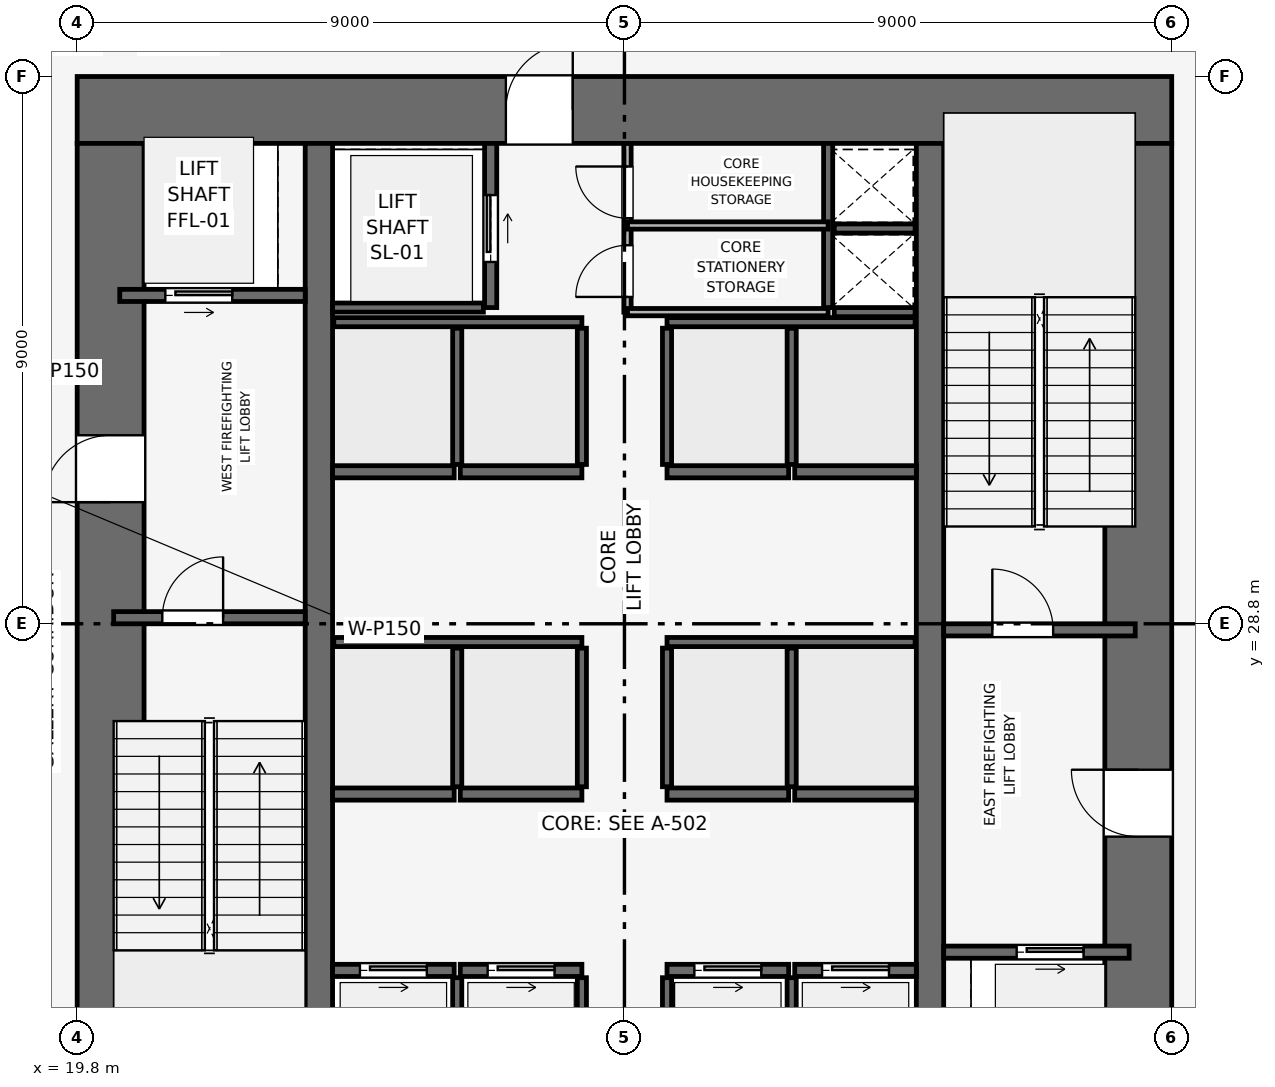
"""IFC4 building model, lengths in metres.
Left out: names, types, materials, properties, quantities, classifications, styles, units other than length and angle.
Written with IfcOpenShell. Run it as: python <this file> out.ifc"""

import sys

from ifc_helpers import new_model, si_unit, direction, frame, frame_2d, origin, place, context, subcontext, project, spatial, rectangle, extrude, element, fill, save


model = new_model("IFC4")
c1 = context("Model", 3, precision=1e-05, world=origin(), true_north=direction((0.0, 1.0)))
c2 = subcontext(c1, "Body", "Model", "MODEL_VIEW")
j1 = project(units=[si_unit("LENGTHUNIT", "METRE"), si_unit("PLANEANGLEUNIT", "RADIAN")], contexts=[c1])
p1 = place(None, origin())
s1 = spatial("IfcSite", under=j1, at=p1, CompositionType="ELEMENT")
p2 = place(p1, origin())
s2 = spatial("IfcBuilding", under=s1, at=p2, CompositionType="ELEMENT")
p3 = place(p2, frame((0.0, 0.0, 19.2)))
s3 = spatial("IfcBuildingStorey", under=s2, at=p3, CompositionType="ELEMENT", Elevation=19.2)
p4 = place(p3, frame((19.8, 37.25, 0.0), z_axis=(0.0, 0.0, 1.0), x_axis=(1.0, 0.0, 0.0)))
e1 = element("IfcWall", 1, at=p4, inside=s3, PredefinedType="SHEAR", context=c2, shape_type="SweptSolid", body=[
    extrude(rectangle(XDim=18.0, YDim=1.1, at=frame_2d((9.0, 0.0))), origin(), (0.0, 0.0, 1.0), 4.8),
])
p5 = place(p4, frame((7.05, 0.0, 0.0)))
e2 = element("IfcOpeningElement", 2, at=p5, cuts=e1, PredefinedType="OPENING", context=c2, shape_type="SweptSolid", body=[
    extrude(rectangle(XDim=1.1, YDim=2.15, at=frame_2d((0.55, 1.075))), frame((0.0, 0.56, 0.0), z_axis=(0.0, -1.0, 0.0), x_axis=(1.0, 0.0, 0.0)), (0.0, 0.0, 1.0), 1.12),
])
p6 = place(p3, frame((20.35, 20.9, 0.0), z_axis=(0.0, 0.0, 1.0), x_axis=(0.0, 1.0, 0.0)))
e3 = element("IfcWall", 3, at=p6, inside=s3, PredefinedType="SHEAR", context=c2, shape_type="SweptSolid", body=[
    extrude(rectangle(XDim=15.8, YDim=1.1, at=frame_2d((7.9, 0.0))), origin(), (0.0, 0.0, 1.0), 4.8),
])
p7 = place(p6, frame((9.9, 0.0, 0.0)))
e4 = element("IfcOpeningElement", 4, at=p7, cuts=e3, PredefinedType="OPENING", context=c2, shape_type="SweptSolid", body=[
    extrude(rectangle(XDim=1.1, YDim=2.15, at=frame_2d((0.55, 1.075))), frame((0.0, 0.56, 0.0), z_axis=(0.0, -1.0, 0.0), x_axis=(1.0, 0.0, 0.0)), (0.0, 0.0, 1.0), 1.12),
])
p8 = place(p3, frame((37.25, 20.9, 0.0), z_axis=(0.0, 0.0, 1.0), x_axis=(0.0, 1.0, 0.0)))
e5 = element("IfcWall", 5, at=p8, inside=s3, PredefinedType="SHEAR", context=c2, shape_type="SweptSolid", body=[
    extrude(rectangle(XDim=15.8, YDim=1.1, at=frame_2d((7.9, 0.0))), origin(), (0.0, 0.0, 1.0), 4.8),
])
p9 = place(p8, frame((4.4, 0.0, 0.0)))
e6 = element("IfcOpeningElement", 6, at=p9, cuts=e5, PredefinedType="OPENING", context=c2, shape_type="SweptSolid", body=[
    extrude(rectangle(XDim=1.1, YDim=2.15, at=frame_2d((0.55, 1.075))), frame((0.0, 0.56, 0.0), z_axis=(0.0, -1.0, 0.0), x_axis=(1.0, 0.0, 0.0)), (0.0, 0.0, 1.0), 1.12),
])
for number, where, z_axis, x_axis in (
    (7, (23.775, 20.9, 0.0), (0.0, 0.0, 1.0), (0.0, 1.0, 0.0)),
    (8, (33.825, 20.9, 0.0), (0.0, 0.0, 1.0), (0.0, 1.0, 0.0)),
):
    element("IfcWall", number, at=place(p3, frame(where, z_axis=z_axis, x_axis=x_axis)), inside=s3, PredefinedType="SHEAR", context=c2, shape_type="SweptSolid", body=[
        extrude(rectangle(XDim=15.8, YDim=0.45, at=frame_2d((7.9, 0.0))), origin(), (0.0, 0.0, 1.0), 4.8),
    ])
p10 = place(p3, frame((20.4, 28.9, 0.0), z_axis=(0.0, 0.0, 1.0), x_axis=(1.0, 0.0, 0.0)))
e9 = element("IfcWall", 9, at=p10, inside=s3, PredefinedType="SHEAR", context=c2, shape_type="SweptSolid", body=[
    extrude(rectangle(XDim=3.15, YDim=0.2, at=frame_2d((1.575, 0.0))), origin(), (0.0, 0.0, 1.0), 4.35),
])
p11 = place(p10, frame((0.8, 0.0, 0.0)))
e10 = element("IfcOpeningElement", 10, at=p11, cuts=e9, PredefinedType="OPENING", context=c2, shape_type="SweptSolid", body=[
    extrude(rectangle(XDim=1.0, YDim=2.1, at=frame_2d((0.5, 1.05))), frame((0.0, 0.11, 0.0), z_axis=(0.0, -1.0, 0.0), x_axis=(1.0, 0.0, 0.0)), (0.0, 0.0, 1.0), 0.22),
])
p12 = place(p3, frame((34.05, 28.7, 0.0), z_axis=(0.0, 0.0, 1.0), x_axis=(1.0, 0.0, 0.0)))
e11 = element("IfcWall", 11, at=p12, inside=s3, PredefinedType="SHEAR", context=c2, shape_type="SweptSolid", body=[
    extrude(rectangle(XDim=3.15, YDim=0.2, at=frame_2d((1.575, 0.0))), origin(), (0.0, 0.0, 1.0), 4.35),
])
p13 = place(p12, frame((0.8, 0.0, 0.0)))
e12 = element("IfcOpeningElement", 12, at=p13, cuts=e11, PredefinedType="OPENING", context=c2, shape_type="SweptSolid", body=[
    extrude(rectangle(XDim=1.0, YDim=2.1, at=frame_2d((0.5, 1.05))), frame((0.0, 0.11, 0.0), z_axis=(0.0, -1.0, 0.0), x_axis=(1.0, 0.0, 0.0)), (0.0, 0.0, 1.0), 0.22),
])
p14 = place(p3, frame((32.15, 34.0, 0.0), z_axis=(0.0, 0.0, 1.0), x_axis=(0.0, 1.0, 0.0)))
e13 = element("IfcWall", 13, at=p14, inside=s3, PredefinedType="SHEAR", context=c2, shape_type="SweptSolid", body=[
    extrude(rectangle(XDim=2.7, YDim=0.15, at=frame_2d((1.35, 0.0))), origin(), (0.0, 0.0, 1.0), 4.35),
])
for number, where, z_axis, x_axis in (
    (14, (32.25, 33.925, 0.0), (0.0, 0.0, 1.0), (1.0, 0.0, 0.0)),
    (15, (32.25, 35.3, 0.0), (0.0, 0.0, 1.0), (1.0, 0.0, 0.0)),
):
    element("IfcWall", number, at=place(p3, frame(where, z_axis=z_axis, x_axis=x_axis)), inside=s3, PredefinedType="SHEAR", context=c2, shape_type="SweptSolid", body=[
        extrude(rectangle(XDim=1.33, YDim=0.15, at=frame_2d((0.665, 0.0))), origin(), (0.0, 0.0, 1.0), 4.35),
    ])
p15 = place(p3, frame((20.5, 34.2, 0.0), z_axis=(0.0, 0.0, 1.0), x_axis=(1.0, 0.0, 0.0)))
e16 = element("IfcWall", 16, at=p15, inside=s3, PredefinedType="SHEAR", context=c2, shape_type="SweptSolid", body=[
    extrude(rectangle(XDim=3.05, YDim=0.2, at=frame_2d((1.525, 0.0))), origin(), (0.0, 0.0, 1.0), 4.35),
])
p16 = place(p15, frame((0.75, 0.0, 0.0)))
e17 = element("IfcOpeningElement", 17, at=p16, cuts=e16, PredefinedType="OPENING", context=c2, shape_type="SweptSolid", body=[
    extrude(rectangle(XDim=1.1, YDim=2.15, at=frame_2d((0.55, 1.075))), frame((0.0, 0.11, 0.0), z_axis=(0.0, -1.0, 0.0), x_axis=(1.0, 0.0, 0.0)), (0.0, 0.0, 1.0), 0.22),
])
p17 = place(p3, frame((34.05, 23.4, 0.0), z_axis=(0.0, 0.0, 1.0), x_axis=(1.0, 0.0, 0.0)))
e18 = element("IfcWall", 18, at=p17, inside=s3, PredefinedType="SHEAR", context=c2, shape_type="SweptSolid", body=[
    extrude(rectangle(XDim=3.05, YDim=0.2, at=frame_2d((1.525, 0.0))), origin(), (0.0, 0.0, 1.0), 4.35),
])
p18 = place(p17, frame((1.2, 0.0, 0.0)))
e19 = element("IfcOpeningElement", 19, at=p18, cuts=e18, PredefinedType="OPENING", context=c2, shape_type="SweptSolid", body=[
    extrude(rectangle(XDim=1.1, YDim=2.15, at=frame_2d((0.55, 1.075))), frame((0.0, 0.11, 0.0), z_axis=(0.0, -1.0, 0.0), x_axis=(1.0, 0.0, 0.0)), (0.0, 0.0, 1.0), 0.22),
])
p19 = place(p3, frame((26.6, 34.0, 0.0), z_axis=(0.0, 0.0, 1.0), x_axis=(0.0, 1.0, 0.0)))
e20 = element("IfcWall", 20, at=p19, inside=s3, PredefinedType="SHEAR", context=c2, shape_type="SweptSolid", body=[
    extrude(rectangle(XDim=2.7, YDim=0.2, at=frame_2d((1.35, 0.0))), origin(), (0.0, 0.0, 1.0), 4.35),
])
p20 = place(p19, frame((0.75, 0.0, 0.0)))
e21 = element("IfcOpeningElement", 21, at=p20, cuts=e20, PredefinedType="OPENING", context=c2, shape_type="SweptSolid", body=[
    extrude(rectangle(XDim=1.1, YDim=2.15, at=frame_2d((0.55, 1.075))), frame((0.0, 0.11, 0.0), z_axis=(0.0, -1.0, 0.0), x_axis=(1.0, 0.0, 0.0)), (0.0, 0.0, 1.0), 0.22),
])
p21 = place(p3, frame((24.0, 34.0, 0.0), z_axis=(0.0, 0.0, 1.0), x_axis=(1.0, 0.0, 0.0)))
e22 = element("IfcWall", 22, at=p21, inside=s3, PredefinedType="SHEAR", context=c2, shape_type="SweptSolid", body=[
    extrude(rectangle(XDim=2.48, YDim=0.15, at=frame_2d((1.24, 0.0))), origin(), (0.0, 0.0, 1.0), 4.35),
])
p22 = place(p3, frame((24.0, 23.1, 0.0), z_axis=(0.0, 0.0, 1.0), x_axis=(1.0, 0.0, 0.0)))
e23 = element("IfcWall", 23, at=p22, inside=s3, PredefinedType="SHEAR", context=c2, shape_type="SweptSolid", body=[
    extrude(rectangle(XDim=2.0, YDim=0.2, at=frame_2d((1.0, 0.0))), origin(), (0.0, 0.0, 1.0), 4.35),
])
p23 = place(p22, frame((0.45, 0.0, 0.0)))
e24 = element("IfcOpeningElement", 24, at=p23, cuts=e23, PredefinedType="OPENING", context=c2, shape_type="SweptSolid", body=[
    extrude(rectangle(XDim=1.1, YDim=2.15, at=frame_2d((0.55, 1.075))), frame((0.0, 0.11, 0.0), z_axis=(0.0, -1.0, 0.0), x_axis=(1.0, 0.0, 0.0)), (0.0, 0.0, 1.0), 0.22),
])
p24 = place(p3, frame((26.1, 23.1, 0.0), z_axis=(0.0, 0.0, 1.0), x_axis=(1.0, 0.0, 0.0)))
e25 = element("IfcWall", 25, at=p24, inside=s3, PredefinedType="SHEAR", context=c2, shape_type="SweptSolid", body=[
    extrude(rectangle(XDim=2.0, YDim=0.2, at=frame_2d((1.0, 0.0))), origin(), (0.0, 0.0, 1.0), 4.35),
])
p25 = place(p24, frame((0.45, 0.0, 0.0)))
e26 = element("IfcOpeningElement", 26, at=p25, cuts=e25, PredefinedType="OPENING", context=c2, shape_type="SweptSolid", body=[
    extrude(rectangle(XDim=1.1, YDim=2.15, at=frame_2d((0.55, 1.075))), frame((0.0, 0.11, 0.0), z_axis=(0.0, -1.0, 0.0), x_axis=(1.0, 0.0, 0.0)), (0.0, 0.0, 1.0), 0.22),
])
p26 = place(p3, frame((29.5, 23.1, 0.0), z_axis=(0.0, 0.0, 1.0), x_axis=(1.0, 0.0, 0.0)))
e27 = element("IfcWall", 27, at=p26, inside=s3, PredefinedType="SHEAR", context=c2, shape_type="SweptSolid", body=[
    extrude(rectangle(XDim=2.0, YDim=0.2, at=frame_2d((1.0, 0.0))), origin(), (0.0, 0.0, 1.0), 4.35),
])
p27 = place(p26, frame((0.45, 0.0, 0.0)))
e28 = element("IfcOpeningElement", 28, at=p27, cuts=e27, PredefinedType="OPENING", context=c2, shape_type="SweptSolid", body=[
    extrude(rectangle(XDim=1.1, YDim=2.15, at=frame_2d((0.55, 1.075))), frame((0.0, 0.11, 0.0), z_axis=(0.0, -1.0, 0.0), x_axis=(1.0, 0.0, 0.0)), (0.0, 0.0, 1.0), 0.22),
])
p28 = place(p3, frame((31.6, 23.1, 0.0), z_axis=(0.0, 0.0, 1.0), x_axis=(1.0, 0.0, 0.0)))
e29 = element("IfcWall", 29, at=p28, inside=s3, PredefinedType="SHEAR", context=c2, shape_type="SweptSolid", body=[
    extrude(rectangle(XDim=2.0, YDim=0.2, at=frame_2d((1.0, 0.0))), origin(), (0.0, 0.0, 1.0), 4.35),
])
p29 = place(p28, frame((0.45, 0.0, 0.0)))
e30 = element("IfcOpeningElement", 30, at=p29, cuts=e29, PredefinedType="OPENING", context=c2, shape_type="SweptSolid", body=[
    extrude(rectangle(XDim=1.1, YDim=2.15, at=frame_2d((0.55, 1.075))), frame((0.0, 0.11, 0.0), z_axis=(0.0, -1.0, 0.0), x_axis=(1.0, 0.0, 0.0)), (0.0, 0.0, 1.0), 0.22),
])
for number, where, z_axis, x_axis in (
    (31, (24.0, 26.0, 0.0), (0.0, 0.0, 1.0), (1.0, 0.0, 0.0)),
    (32, (26.1, 26.0, 0.0), (0.0, 0.0, 1.0), (1.0, 0.0, 0.0)),
    (33, (29.5, 26.0, 0.0), (0.0, 0.0, 1.0), (1.0, 0.0, 0.0)),
    (34, (31.6, 26.0, 0.0), (0.0, 0.0, 1.0), (1.0, 0.0, 0.0)),
    (35, (24.0, 31.3, 0.0), (0.0, 0.0, 1.0), (1.0, 0.0, 0.0)),
    (36, (26.1, 31.3, 0.0), (0.0, 0.0, 1.0), (1.0, 0.0, 0.0)),
    (37, (29.5, 31.3, 0.0), (0.0, 0.0, 1.0), (1.0, 0.0, 0.0)),
    (38, (31.6, 31.3, 0.0), (0.0, 0.0, 1.0), (1.0, 0.0, 0.0)),
):
    element("IfcWall", number, at=place(p3, frame(where, z_axis=z_axis, x_axis=x_axis)), inside=s3, PredefinedType="SHEAR", context=c2, shape_type="SweptSolid", body=[
        extrude(rectangle(XDim=2.0, YDim=0.2, at=frame_2d((1.0, 0.0))), origin(), (0.0, 0.0, 1.0), 4.35),
    ])
for number, where, z_axis, x_axis in (
    (39, (26.05, 20.92, 0.0), (0.0, 0.0, 1.0), (0.0, 1.0, 0.0)),
    (40, (28.1, 20.92, 0.0), (0.0, 0.0, 1.0), (0.0, 1.0, 0.0)),
    (41, (29.5, 20.92, 0.0), (0.0, 0.0, 1.0), (0.0, 1.0, 0.0)),
    (42, (31.55, 20.92, 0.0), (0.0, 0.0, 1.0), (0.0, 1.0, 0.0)),
):
    element("IfcWall", number, at=place(p3, frame(where, z_axis=z_axis, x_axis=x_axis)), inside=s3, PredefinedType="SHEAR", context=c2, shape_type="SweptSolid", body=[
        extrude(rectangle(XDim=2.06, YDim=0.15, at=frame_2d((1.03, 0.0))), origin(), (0.0, 0.0, 1.0), 4.35),
    ])
for number, where, z_axis, x_axis in (
    (43, (24.02, 28.5, 0.0), (0.0, 0.0, 1.0), (1.0, 0.0, 0.0)),
    (44, (29.5, 28.5, 0.0), (0.0, 0.0, 1.0), (1.0, 0.0, 0.0)),
):
    element("IfcWall", number, at=place(p3, frame(where, z_axis=z_axis, x_axis=x_axis)), inside=s3, PredefinedType="SHEAR", context=c2, shape_type="SweptSolid", body=[
        extrude(rectangle(XDim=4.08, YDim=0.15, at=frame_2d((2.04, 0.0))), origin(), (0.0, 0.0, 1.0), 4.35),
    ])
for number, where, z_axis, x_axis in (
    (45, (26.05, 26.12, 0.0), (0.0, 0.0, 1.0), (0.0, 1.0, 0.0)),
    (46, (28.1, 26.12, 0.0), (0.0, 0.0, 1.0), (0.0, 1.0, 0.0)),
    (47, (29.5, 26.12, 0.0), (0.0, 0.0, 1.0), (0.0, 1.0, 0.0)),
    (48, (31.55, 26.12, 0.0), (0.0, 0.0, 1.0), (0.0, 1.0, 0.0)),
):
    element("IfcWall", number, at=place(p3, frame(where, z_axis=z_axis, x_axis=x_axis)), inside=s3, PredefinedType="SHEAR", context=c2, shape_type="SweptSolid", body=[
        extrude(rectangle(XDim=2.28, YDim=0.15, at=frame_2d((1.14, 0.0))), origin(), (0.0, 0.0, 1.0), 4.35),
    ])
for number, where, z_axis, x_axis in (
    (49, (24.02, 33.76, 0.0), (0.0, 0.0, 1.0), (1.0, 0.0, 0.0)),
    (50, (29.5, 33.76, 0.0), (0.0, 0.0, 1.0), (1.0, 0.0, 0.0)),
):
    element("IfcWall", number, at=place(p3, frame(where, z_axis=z_axis, x_axis=x_axis)), inside=s3, PredefinedType="SHEAR", context=c2, shape_type="SweptSolid", body=[
        extrude(rectangle(XDim=4.08, YDim=0.15, at=frame_2d((2.04, 0.0))), origin(), (0.0, 0.0, 1.0), 4.35),
    ])
for number, where, z_axis, x_axis in (
    (51, (26.05, 31.42, 0.0), (0.0, 0.0, 1.0), (0.0, 1.0, 0.0)),
    (52, (28.1, 31.42, 0.0), (0.0, 0.0, 1.0), (0.0, 1.0, 0.0)),
    (53, (29.5, 31.42, 0.0), (0.0, 0.0, 1.0), (0.0, 1.0, 0.0)),
    (54, (31.55, 31.42, 0.0), (0.0, 0.0, 1.0), (0.0, 1.0, 0.0)),
):
    element("IfcWall", number, at=place(p3, frame(where, z_axis=z_axis, x_axis=x_axis)), inside=s3, PredefinedType="SHEAR", context=c2, shape_type="SweptSolid", body=[
        extrude(rectangle(XDim=2.24, YDim=0.15, at=frame_2d((1.12, 0.0))), origin(), (0.0, 0.0, 1.0), 4.35),
    ])
p30 = place(p3, frame((28.85, 33.925, 0.0), z_axis=(0.0, 0.0, 1.0), x_axis=(0.0, 1.0, 0.0)))
e55 = element("IfcWall", 55, at=p30, inside=s3, PredefinedType="PARTITIONING", context=c2, shape_type="SweptSolid", body=[
    extrude(rectangle(XDim=2.775, YDim=0.12, at=frame_2d((1.387, 0.0))), origin(), (0.0, 0.0, 1.0), 4.35),
])
p31 = place(p30, frame((0.25, 0.0, 0.0)))
e56 = element("IfcOpeningElement", 56, at=p31, cuts=e55, PredefinedType="OPENING", context=c2, shape_type="SweptSolid", body=[
    extrude(rectangle(XDim=0.85, YDim=2.1, at=frame_2d((0.425, 1.05))), frame((0.0, 0.07, 0.0), z_axis=(0.0, -1.0, 0.0), x_axis=(1.0, 0.0, 0.0)), (0.0, 0.0, 1.0), 0.14),
])
p32 = place(p30, frame((1.545, 0.0, 0.0)))
e57 = element("IfcOpeningElement", 57, at=p32, cuts=e55, PredefinedType="OPENING", context=c2, shape_type="SweptSolid", body=[
    extrude(rectangle(XDim=0.85, YDim=2.1, at=frame_2d((0.425, 1.05))), frame((0.0, 0.07, 0.0), z_axis=(0.0, -1.0, 0.0), x_axis=(1.0, 0.0, 0.0)), (0.0, 0.0, 1.0), 0.14),
])
for number, where, z_axis, x_axis in (
    (58, (28.85, 35.35, 0.0), (0.0, 0.0, 1.0), (1.0, 0.0, 0.0)),
    (59, (28.85, 33.925, 0.0), (0.0, 0.0, 1.0), (1.0, 0.0, 0.0)),
):
    element("IfcWall", number, at=place(p3, frame(where, z_axis=z_axis, x_axis=x_axis)), inside=s3, PredefinedType="PARTITIONING", context=c2, shape_type="SweptSolid", body=[
        extrude(rectangle(XDim=3.3, YDim=0.12, at=frame_2d((1.65, 0.0))), origin(), (0.0, 0.0, 1.0), 4.35),
    ])
p33 = place(p11, origin())
e60 = element("IfcDoor", 60, at=p33, inside=s3, OperationType="SINGLE_SWING_RIGHT", PredefinedType="DOOR", context=c2, shape_type="SweptSolid", body=[
    extrude(rectangle(XDim=1.0, YDim=2.1, at=frame_2d((0.5, 1.05))), frame((0.0, 0.025, 0.0), z_axis=(0.0, -1.0, 0.0), x_axis=(1.0, 0.0, 0.0)), (0.0, 0.0, 1.0), 0.05),
])
fill(e10, e60)
p34 = place(p13, origin())
e61 = element("IfcDoor", 61, at=p34, inside=s3, OperationType="SINGLE_SWING_LEFT", PredefinedType="DOOR", context=c2, shape_type="SweptSolid", body=[
    extrude(rectangle(XDim=1.0, YDim=2.1, at=frame_2d((0.5, 1.05))), frame((0.0, 0.025, 0.0), z_axis=(0.0, -1.0, 0.0), x_axis=(1.0, 0.0, 0.0)), (0.0, 0.0, 1.0), 0.05),
])
fill(e12, e61)
p35 = place(p16, origin())
e62 = element("IfcDoor", 62, at=p35, inside=s3, OperationType="SLIDING_TO_RIGHT", PredefinedType="DOOR", context=c2, shape_type="SweptSolid", body=[
    extrude(rectangle(XDim=1.1, YDim=2.15, at=frame_2d((0.55, 1.075))), frame((0.0, 0.025, 0.0), z_axis=(0.0, -1.0, 0.0), x_axis=(1.0, 0.0, 0.0)), (0.0, 0.0, 1.0), 0.05),
])
fill(e17, e62)
p36 = place(p18, origin())
e63 = element("IfcDoor", 63, at=p36, inside=s3, OperationType="SLIDING_TO_RIGHT", PredefinedType="DOOR", context=c2, shape_type="SweptSolid", body=[
    extrude(rectangle(XDim=1.1, YDim=2.15, at=frame_2d((0.55, 1.075))), frame((0.0, 0.025, 0.0), z_axis=(0.0, -1.0, 0.0), x_axis=(1.0, 0.0, 0.0)), (0.0, 0.0, 1.0), 0.05),
])
fill(e19, e63)
p37 = place(p20, origin())
e64 = element("IfcDoor", 64, at=p37, inside=s3, OperationType="SLIDING_TO_RIGHT", PredefinedType="DOOR", context=c2, shape_type="SweptSolid", body=[
    extrude(rectangle(XDim=1.1, YDim=2.15, at=frame_2d((0.55, 1.075))), frame((0.0, 0.025, 0.0), z_axis=(0.0, -1.0, 0.0), x_axis=(1.0, 0.0, 0.0)), (0.0, 0.0, 1.0), 0.05),
])
fill(e21, e64)
p38 = place(p23, origin())
e65 = element("IfcDoor", 65, at=p38, inside=s3, OperationType="SLIDING_TO_RIGHT", PredefinedType="DOOR", context=c2, shape_type="SweptSolid", body=[
    extrude(rectangle(XDim=1.1, YDim=2.15, at=frame_2d((0.55, 1.075))), frame((0.0, 0.025, 0.0), z_axis=(0.0, -1.0, 0.0), x_axis=(1.0, 0.0, 0.0)), (0.0, 0.0, 1.0), 0.05),
])
fill(e24, e65)
p39 = place(p25, origin())
e66 = element("IfcDoor", 66, at=p39, inside=s3, OperationType="SLIDING_TO_RIGHT", PredefinedType="DOOR", context=c2, shape_type="SweptSolid", body=[
    extrude(rectangle(XDim=1.1, YDim=2.15, at=frame_2d((0.55, 1.075))), frame((0.0, 0.025, 0.0), z_axis=(0.0, -1.0, 0.0), x_axis=(1.0, 0.0, 0.0)), (0.0, 0.0, 1.0), 0.05),
])
fill(e26, e66)
p40 = place(p27, origin())
e67 = element("IfcDoor", 67, at=p40, inside=s3, OperationType="SLIDING_TO_RIGHT", PredefinedType="DOOR", context=c2, shape_type="SweptSolid", body=[
    extrude(rectangle(XDim=1.1, YDim=2.15, at=frame_2d((0.55, 1.075))), frame((0.0, 0.025, 0.0), z_axis=(0.0, -1.0, 0.0), x_axis=(1.0, 0.0, 0.0)), (0.0, 0.0, 1.0), 0.05),
])
fill(e28, e67)
p41 = place(p29, origin())
e68 = element("IfcDoor", 68, at=p41, inside=s3, OperationType="SLIDING_TO_RIGHT", PredefinedType="DOOR", context=c2, shape_type="SweptSolid", body=[
    extrude(rectangle(XDim=1.1, YDim=2.15, at=frame_2d((0.55, 1.075))), frame((0.0, 0.025, 0.0), z_axis=(0.0, -1.0, 0.0), x_axis=(1.0, 0.0, 0.0)), (0.0, 0.0, 1.0), 0.05),
])
fill(e30, e68)
p42 = place(p31, origin())
e69 = element("IfcDoor", 69, at=p42, inside=s3, OperationType="SINGLE_SWING_LEFT", PredefinedType="DOOR", context=c2, shape_type="SweptSolid", body=[
    extrude(rectangle(XDim=0.85, YDim=2.1, at=frame_2d((0.425, 1.05))), frame((0.0, 0.025, 0.0), z_axis=(0.0, -1.0, 0.0), x_axis=(1.0, 0.0, 0.0)), (0.0, 0.0, 1.0), 0.05),
])
fill(e56, e69)
p43 = place(p32, origin())
e70 = element("IfcDoor", 70, at=p43, inside=s3, OperationType="SINGLE_SWING_RIGHT", PredefinedType="DOOR", context=c2, shape_type="SweptSolid", body=[
    extrude(rectangle(XDim=0.85, YDim=2.1, at=frame_2d((0.425, 1.05))), frame((0.0, 0.025, 0.0), z_axis=(0.0, -1.0, 0.0), x_axis=(1.0, 0.0, 0.0)), (0.0, 0.0, 1.0), 0.05),
])
fill(e57, e70)
p44 = place(p7, origin())
e71 = element("IfcDoor", 71, at=p44, inside=s3, OperationType="SINGLE_SWING_LEFT", PredefinedType="DOOR", context=c2, shape_type="SweptSolid", body=[
    extrude(rectangle(XDim=1.1, YDim=2.15, at=frame_2d((0.55, 1.075))), frame((0.0, 0.025, 0.0), z_axis=(0.0, -1.0, 0.0), x_axis=(1.0, 0.0, 0.0)), (0.0, 0.0, 1.0), 0.05),
])
fill(e4, e71)
p45 = place(p9, origin())
e72 = element("IfcDoor", 72, at=p45, inside=s3, OperationType="SINGLE_SWING_RIGHT", PredefinedType="DOOR", context=c2, shape_type="SweptSolid", body=[
    extrude(rectangle(XDim=1.1, YDim=2.15, at=frame_2d((0.55, 1.075))), frame((0.0, 0.025, 0.0), z_axis=(0.0, -1.0, 0.0), x_axis=(1.0, 0.0, 0.0)), (0.0, 0.0, 1.0), 0.05),
])
fill(e6, e72)
p46 = place(p5, origin())
e73 = element("IfcDoor", 73, at=p46, inside=s3, OperationType="SINGLE_SWING_RIGHT", PredefinedType="DOOR", context=c2, shape_type="SweptSolid", body=[
    extrude(rectangle(XDim=1.1, YDim=2.15, at=frame_2d((0.55, 1.075))), frame((0.0, 0.025, 0.0), z_axis=(0.0, -1.0, 0.0), x_axis=(1.0, 0.0, 0.0)), (0.0, 0.0, 1.0), 0.05),
])
fill(e2, e73)
save(model, sys.argv[1])
